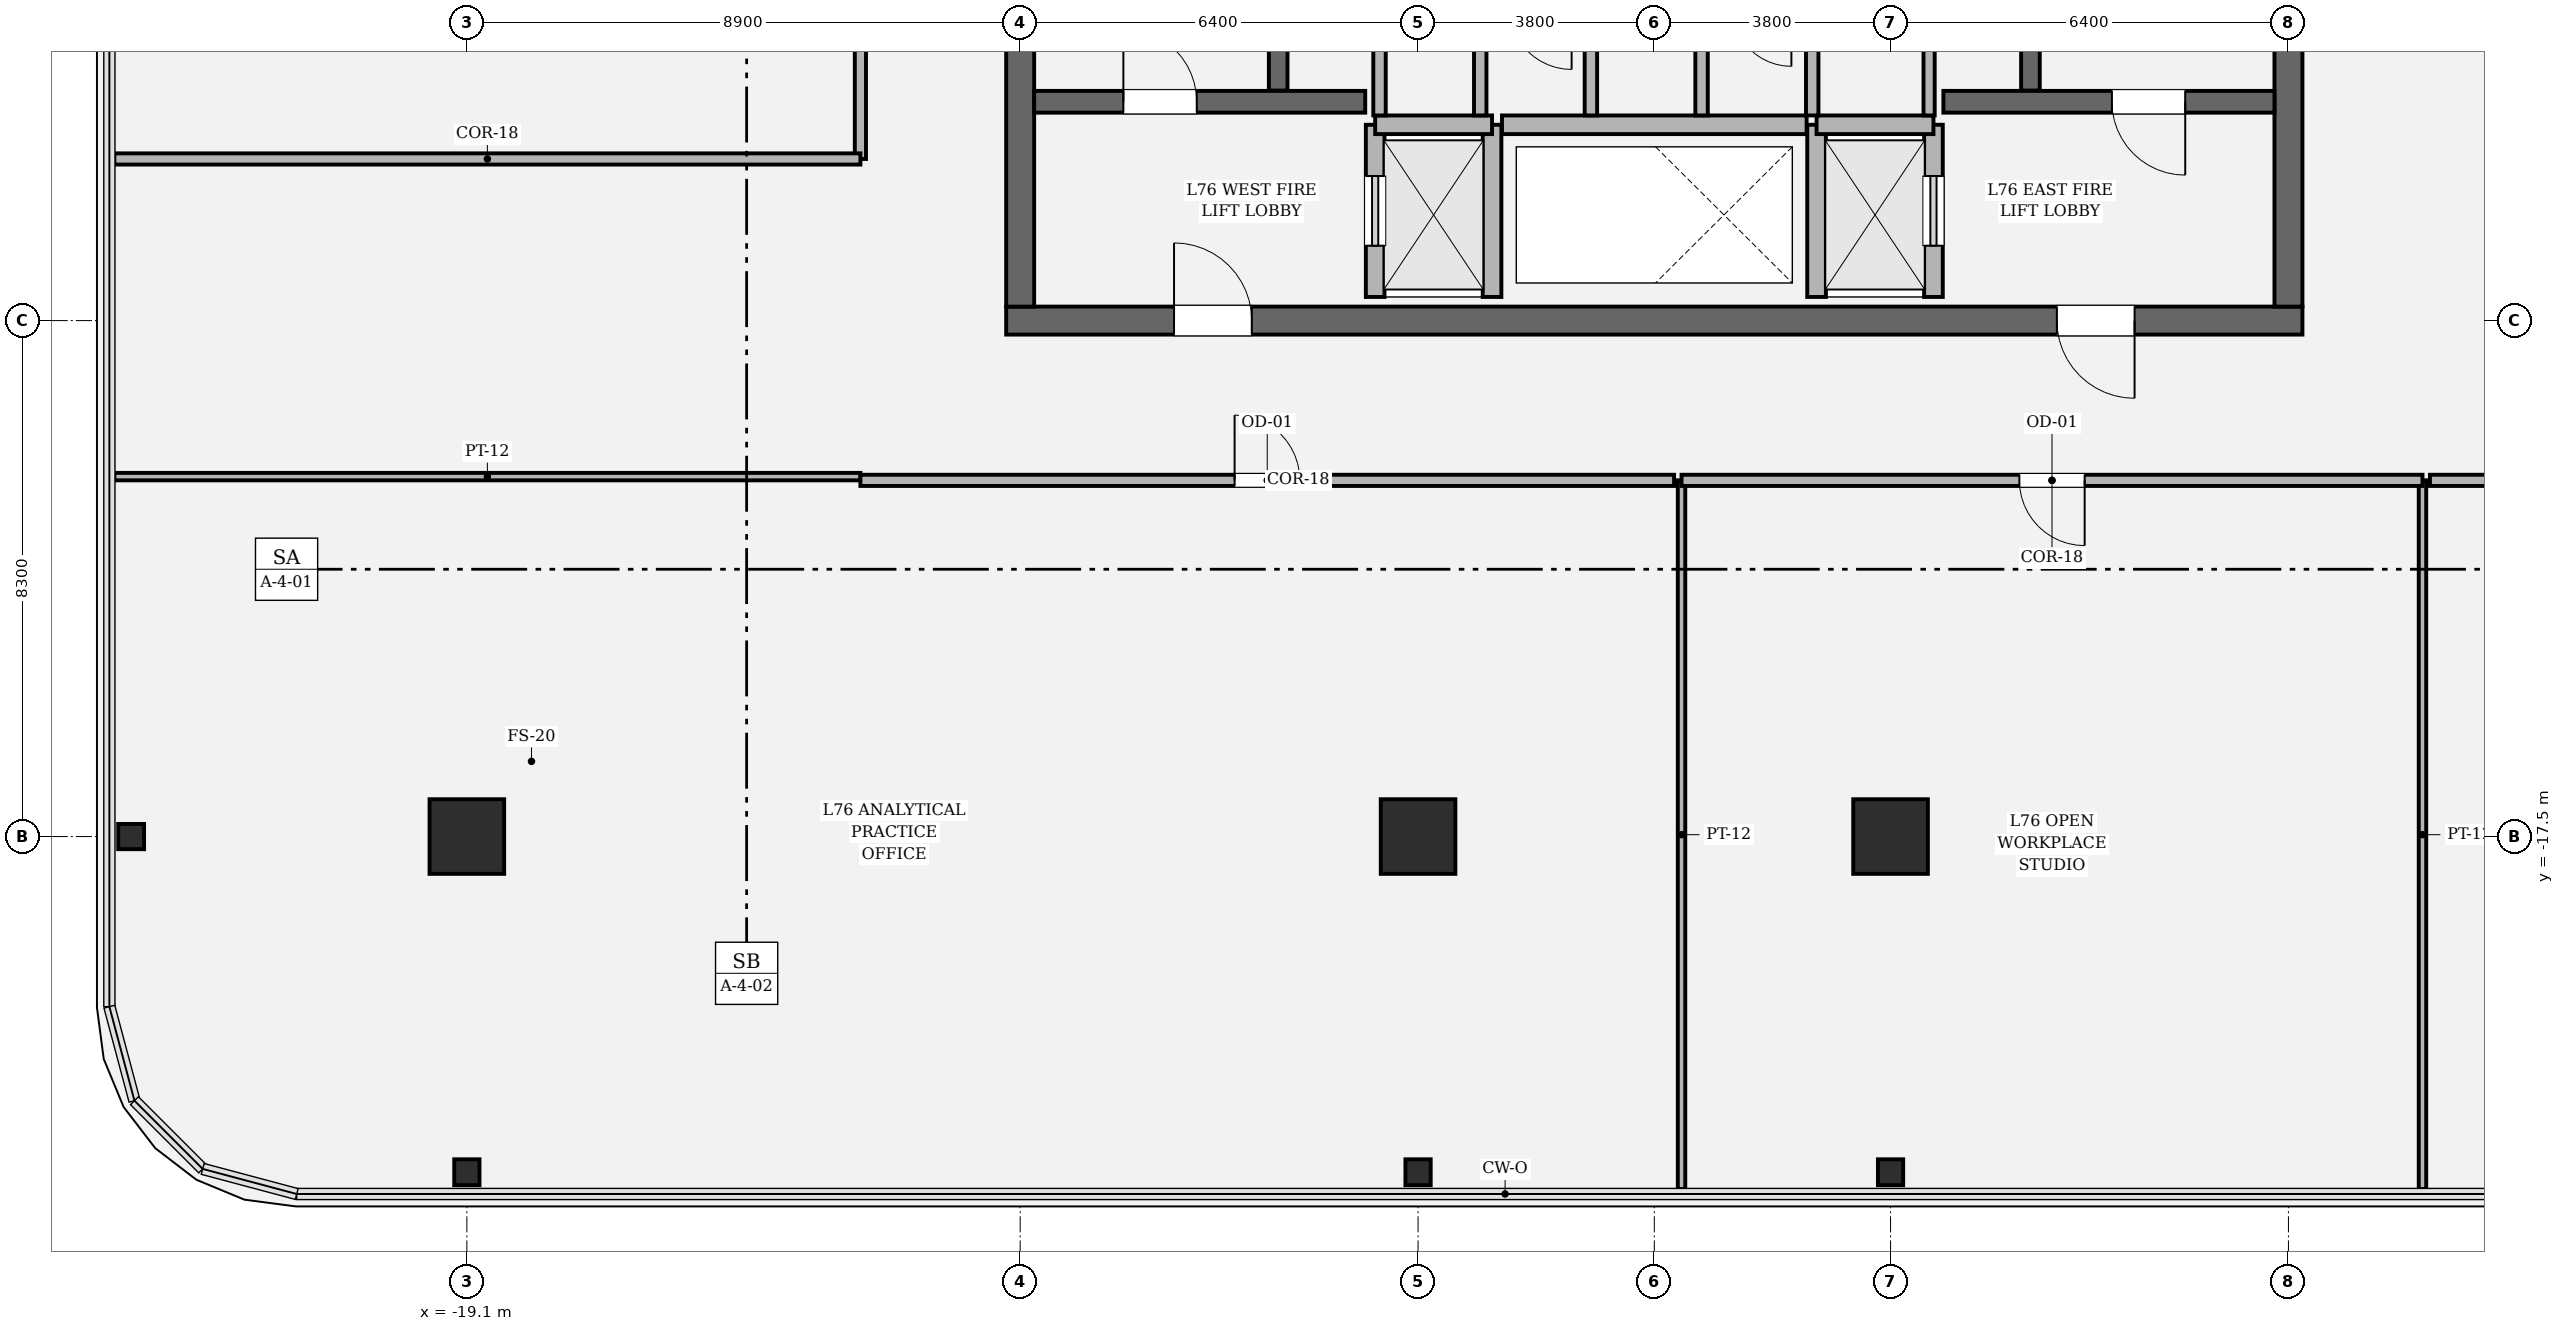
"""IFC4 building model, lengths in metres.
Left out: names, types, materials, properties, quantities, classifications, styles, units other than length and angle.
Written with IfcOpenShell. Run it as: python <this file> out.ifc"""

import sys

from ifc_helpers import new_model, si_unit, direction, frame, frame_2d, origin, origin_2d, place, context, subcontext, project, spatial, rectangle, hollow_rectangle, i_section, extrude, element, fill, save


model = new_model("IFC4")
c1 = context("Model", 3, precision=1e-05, world=origin(), true_north=direction((0.0, 1.0)))
c2 = subcontext(c1, "Body", "Model", "MODEL_VIEW")
j1 = project(units=[si_unit("LENGTHUNIT", "METRE"), si_unit("PLANEANGLEUNIT", "RADIAN")], contexts=[c1])
p1 = place(None, origin())
s1 = spatial("IfcSite", under=j1, at=p1, CompositionType="ELEMENT")
p2 = place(p1, origin())
s2 = spatial("IfcBuilding", under=s1, at=p2, CompositionType="ELEMENT")
p3 = place(p2, frame((0.0, 0.0, 321.6)))
s3 = spatial("IfcBuildingStorey", under=s2, at=p3, CompositionType="ELEMENT", Elevation=321.6)
p4 = place(p3, frame((10.425, -9.2, 0.0), z_axis=(0.0, 0.0, 1.0), x_axis=(-1.0, 0.0, 0.0)))
e1 = element("IfcWall", 1, at=p4, inside=s3, PredefinedType="SHEAR", context=c2, shape_type="SweptSolid", body=[
    extrude(rectangle(XDim=20.85, YDim=0.45, at=frame_2d((10.425, 0.0))), origin(), (0.0, 0.0, 1.0), 4.2),
])
p5 = place(p4, frame((2.7, 0.0, 0.0)))
e2 = element("IfcOpeningElement", 2, at=p5, cuts=e1, PredefinedType="OPENING", context=c2, shape_type="SweptSolid", body=[
    extrude(rectangle(XDim=1.25, YDim=2.25, at=frame_2d((0.625, 1.125))), frame((0.0, 0.235, 0.0), z_axis=(0.0, -1.0, 0.0), x_axis=(1.0, 0.0, 0.0)), (0.0, 0.0, 1.0), 0.47),
])
p6 = place(p4, frame((16.9, 0.0, 0.0)))
e3 = element("IfcOpeningElement", 3, at=p6, cuts=e1, PredefinedType="OPENING", context=c2, shape_type="SweptSolid", body=[
    extrude(rectangle(XDim=1.25, YDim=2.25, at=frame_2d((0.625, 1.125))), frame((0.0, 0.235, 0.0), z_axis=(0.0, -1.0, 0.0), x_axis=(1.0, 0.0, 0.0)), (0.0, 0.0, 1.0), 0.47),
])
p7 = place(p3, frame((-10.2, -8.975, 0.0), z_axis=(0.0, 0.0, 1.0), x_axis=(0.0, 1.0, 0.0)))
e4 = element("IfcWall", 4, at=p7, inside=s3, PredefinedType="SHEAR", context=c2, shape_type="SweptSolid", body=[
    extrude(rectangle(XDim=17.95, YDim=0.45, at=frame_2d((8.975, 0.0))), origin(), (0.0, 0.0, 1.0), 4.2),
])
p8 = place(p7, frame((12.765, 0.0, 0.0)))
e5 = element("IfcOpeningElement", 5, at=p8, cuts=e4, PredefinedType="OPENING", context=c2, shape_type="SweptSolid", body=[
    extrude(rectangle(XDim=1.18, YDim=2.2, at=frame_2d((0.59, 1.1))), frame((0.0, 0.235, 0.0), z_axis=(0.0, -1.0, 0.0), x_axis=(1.0, 0.0, 0.0)), (0.0, 0.0, 1.0), 0.47),
])
p9 = place(p3, frame((10.2, 8.975, 0.0), z_axis=(0.0, 0.0, 1.0), x_axis=(0.0, -1.0, 0.0)))
e6 = element("IfcWall", 6, at=p9, inside=s3, PredefinedType="SHEAR", context=c2, shape_type="SweptSolid", body=[
    extrude(rectangle(XDim=17.95, YDim=0.45, at=frame_2d((8.975, 0.0))), origin(), (0.0, 0.0, 1.0), 4.2),
])
p10 = place(p9, frame((4.005, 0.0, 0.0)))
e7 = element("IfcOpeningElement", 7, at=p10, cuts=e6, PredefinedType="OPENING", context=c2, shape_type="SweptSolid", body=[
    extrude(rectangle(XDim=1.18, YDim=2.2, at=frame_2d((0.59, 1.1))), frame((0.0, 0.235, 0.0), z_axis=(0.0, -1.0, 0.0), x_axis=(1.0, 0.0, 0.0)), (0.0, 0.0, 1.0), 0.47),
])
for number, where, z_axis, x_axis in (
    (8, (-6.05, -5.5, 0.0), (0.0, 0.0, 1.0), (0.0, 1.0, 0.0)),
    (9, (6.05, 3.45, 0.0), (0.0, 0.0, 1.0), (0.0, -1.0, 0.0)),
):
    element("IfcWall", number, at=place(p3, frame(where, z_axis=z_axis, x_axis=x_axis)), inside=s3, PredefinedType="SOLIDWALL", context=c2, shape_type="SweptSolid", body=[
        extrude(rectangle(XDim=8.95, YDim=0.3, at=frame_2d((4.475, 0.0))), origin(), (0.0, 0.0, 1.0), 4.2),
    ])
p11 = place(p3, frame((-9.975, -5.68, 0.0), z_axis=(0.0, 0.0, 1.0), x_axis=(1.0, 0.0, 0.0)))
e10 = element("IfcWall", 10, at=p11, inside=s3, PredefinedType="SOLIDWALL", context=c2, shape_type="SweptSolid", body=[
    extrude(rectangle(XDim=5.325, YDim=0.35, at=frame_2d((2.663, 0.0))), origin(), (0.0, 0.0, 1.0), 4.2),
])
p12 = place(p11, frame((1.435, 0.0, 0.0)))
e11 = element("IfcOpeningElement", 11, at=p12, cuts=e10, PredefinedType="OPENING", context=c2, shape_type="SweptSolid", body=[
    extrude(rectangle(XDim=1.18, YDim=2.2, at=frame_2d((0.59, 1.1))), frame((0.0, 0.185, 0.0), z_axis=(0.0, -1.0, 0.0), x_axis=(1.0, 0.0, 0.0)), (0.0, 0.0, 1.0), 0.37),
])
p13 = place(p3, frame((4.65, -5.68, 0.0), z_axis=(0.0, 0.0, 1.0), x_axis=(1.0, 0.0, 0.0)))
e12 = element("IfcWall", 12, at=p13, inside=s3, PredefinedType="SOLIDWALL", context=c2, shape_type="SweptSolid", body=[
    extrude(rectangle(XDim=5.325, YDim=0.35, at=frame_2d((2.663, 0.0))), origin(), (0.0, 0.0, 1.0), 4.2),
])
p14 = place(p13, frame((2.71, 0.0, 0.0)))
e13 = element("IfcOpeningElement", 13, at=p14, cuts=e12, PredefinedType="OPENING", context=c2, shape_type="SweptSolid", body=[
    extrude(rectangle(XDim=1.18, YDim=2.2, at=frame_2d((0.59, 1.1))), frame((0.0, 0.185, 0.0), z_axis=(0.0, -1.0, 0.0), x_axis=(1.0, 0.0, 0.0)), (0.0, 0.0, 1.0), 0.37),
])
for number, where, z_axis, x_axis in (
    (14, (-19.1, -17.5, 0.0), (0.0, 0.0, 1.0), (1.0, 0.0, 0.0)),
    (15, (-3.8, -17.5, 0.0), (0.0, 0.0, 1.0), (1.0, 0.0, 0.0)),
    (16, (3.8, -17.5, 0.0), (0.0, 0.0, 1.0), (1.0, 0.0, 0.0)),
):
    element("IfcColumn", number, at=place(p3, frame(where, z_axis=z_axis, x_axis=x_axis)), inside=s3, PredefinedType="COLUMN", context=c2, shape_type="SweptSolid", body=[
        extrude(hollow_rectangle(XDim=1.2, YDim=1.2, WallThickness=0.035, at=origin_2d()), origin(), (0.0, 0.0, 1.0), 4.2),
    ])
for number, where, z_axis, x_axis in (
    (17, (-19.1, -22.9, 0.0), (0.0, 0.0, 1.0), (1.0, 0.0, 0.0)),
    (18, (-3.8, -22.9, 0.0), (0.0, 0.0, 1.0), (1.0, 0.0, 0.0)),
    (19, (3.8, -22.9, 0.0), (0.0, 0.0, 1.0), (1.0, 0.0, 0.0)),
    (20, (-24.5, -17.5, 0.0), (0.0, 0.0, 1.0), (0.0, 1.0, 0.0)),
):
    element("IfcColumn", number, at=place(p3, frame(where, z_axis=z_axis, x_axis=x_axis)), inside=s3, PredefinedType="COLUMN", context=c2, shape_type="SweptSolid", body=[
        extrude(i_section(OverallWidth=0.406, OverallDepth=0.416, WebThickness=0.029, FlangeThickness=0.048, FilletRadius=0.018, at=origin_2d()), origin(), (0.0, 0.0, 1.0), 4.198),
    ])
p15 = place(p3, frame((-4.49, -8.82, 0.0), z_axis=(0.0, 0.0, 1.0), x_axis=(0.0, 1.0, 0.0)))
e21 = element("IfcWall", 21, at=p15, inside=s3, PredefinedType="SOLIDWALL", context=c2, shape_type="SweptSolid", body=[
    extrude(rectangle(XDim=2.77, YDim=0.3, at=frame_2d((1.385, 0.0))), origin(), (0.0, 0.0, 1.0), 4.0),
])
p16 = place(p15, frame((0.825, 0.0, 0.0)))
e22 = element("IfcOpeningElement", 22, at=p16, cuts=e21, PredefinedType="OPENING", context=c2, shape_type="SweptSolid", body=[
    extrude(rectangle(XDim=1.12, YDim=2.25, at=frame_2d((0.56, 1.125))), frame((0.0, 0.16, 0.0), z_axis=(0.0, -1.0, 0.0), x_axis=(1.0, 0.0, 0.0)), (0.0, 0.0, 1.0), 0.32),
])
p17 = place(p3, frame((-2.61, -8.82, 0.0), z_axis=(0.0, 0.0, 1.0), x_axis=(0.0, 1.0, 0.0)))
e23 = element("IfcWall", 23, at=p17, inside=s3, PredefinedType="SOLIDWALL", context=c2, shape_type="SweptSolid", body=[
    extrude(rectangle(XDim=2.77, YDim=0.3, at=frame_2d((1.385, 0.0))), origin(), (0.0, 0.0, 1.0), 4.0),
])
p18 = place(p3, frame((-4.49, -6.05, 0.0), z_axis=(0.0, 0.0, 1.0), x_axis=(1.0, 0.0, 0.0)))
e24 = element("IfcWall", 24, at=p18, inside=s3, PredefinedType="SOLIDWALL", context=c2, shape_type="SweptSolid", body=[
    extrude(rectangle(XDim=1.88, YDim=0.3, at=frame_2d((0.94, 0.0))), origin(), (0.0, 0.0, 1.0), 4.0),
])
p19 = place(p3, frame((4.49, -8.82, 0.0), z_axis=(0.0, 0.0, 1.0), x_axis=(0.0, 1.0, 0.0)))
e25 = element("IfcWall", 25, at=p19, inside=s3, PredefinedType="SOLIDWALL", context=c2, shape_type="SweptSolid", body=[
    extrude(rectangle(XDim=2.77, YDim=0.3, at=frame_2d((1.385, 0.0))), origin(), (0.0, 0.0, 1.0), 4.0),
])
p20 = place(p19, frame((0.825, 0.0, 0.0)))
e26 = element("IfcOpeningElement", 26, at=p20, cuts=e25, PredefinedType="OPENING", context=c2, shape_type="SweptSolid", body=[
    extrude(rectangle(XDim=1.12, YDim=2.25, at=frame_2d((0.56, 1.125))), frame((0.0, 0.16, 0.0), z_axis=(0.0, -1.0, 0.0), x_axis=(1.0, 0.0, 0.0)), (0.0, 0.0, 1.0), 0.32),
])
p21 = place(p3, frame((2.61, -8.82, 0.0), z_axis=(0.0, 0.0, 1.0), x_axis=(0.0, 1.0, 0.0)))
e27 = element("IfcWall", 27, at=p21, inside=s3, PredefinedType="SOLIDWALL", context=c2, shape_type="SweptSolid", body=[
    extrude(rectangle(XDim=2.77, YDim=0.3, at=frame_2d((1.385, 0.0))), origin(), (0.0, 0.0, 1.0), 4.0),
])
p22 = place(p3, frame((2.61, -6.05, 0.0), z_axis=(0.0, 0.0, 1.0), x_axis=(1.0, 0.0, 0.0)))
e28 = element("IfcWall", 28, at=p22, inside=s3, PredefinedType="SOLIDWALL", context=c2, shape_type="SweptSolid", body=[
    extrude(rectangle(XDim=1.88, YDim=0.3, at=frame_2d((0.94, 0.0))), origin(), (0.0, 0.0, 1.0), 4.0),
])
p23 = place(p3, frame((-2.45, -6.05, 0.0), z_axis=(0.0, 0.0, 1.0), x_axis=(1.0, 0.0, 0.0)))
e29 = element("IfcWall", 29, at=p23, inside=s3, PredefinedType="SOLIDWALL", context=c2, shape_type="SweptSolid", body=[
    extrude(rectangle(XDim=4.9, YDim=0.3, at=frame_2d((2.45, 0.0))), origin(), (0.0, 0.0, 1.0), 4.0),
])
for number, where, z_axis, x_axis in (
    (30, (-2.8, -5.9, 0.0), (0.0, 0.0, 1.0), (0.0, 1.0, 0.0)),
    (31, (-4.42, -4.16, 0.0), (0.0, 0.0, 1.0), (0.0, -1.0, 0.0)),
    (32, (-1.02, -5.9, 0.0), (0.0, 0.0, 1.0), (0.0, 1.0, 0.0)),
    (33, (0.76, -5.9, 0.0), (0.0, 0.0, 1.0), (0.0, 1.0, 0.0)),
    (34, (2.54, -5.9, 0.0), (0.0, 0.0, 1.0), (0.0, 1.0, 0.0)),
):
    element("IfcWall", number, at=place(p3, frame(where, z_axis=z_axis, x_axis=x_axis)), inside=s3, PredefinedType="SOLIDWALL", context=c2, shape_type="SweptSolid", body=[
        extrude(rectangle(XDim=1.74, YDim=0.2, at=frame_2d((0.87, 0.0))), origin(), (0.0, 0.0, 1.0), 4.0),
    ])
p24 = place(p3, frame((4.42, -5.9, 0.0), z_axis=(0.0, 0.0, 1.0), x_axis=(0.0, 1.0, 0.0)))
e35 = element("IfcWall", 35, at=p24, inside=s3, PredefinedType="PARTITIONING", context=c2, shape_type="SweptSolid", body=[
    extrude(rectangle(XDim=1.74, YDim=0.18, at=frame_2d((0.87, 0.0))), origin(), (0.0, 0.0, 1.0), 4.0),
])
for number, where, z_axis, x_axis in (
    (36, (12.356, -11.77, 0.0), (0.0, 0.0, 1.0), (0.0, -1.0, 0.0)),
    (37, (0.438, -23.17, 0.0), (0.0, 0.0, 1.0), (0.0, 1.0, 0.0)),
):
    element("IfcWall", number, at=place(p3, frame(where, z_axis=z_axis, x_axis=x_axis)), inside=s3, PredefinedType="PARTITIONING", context=c2, shape_type="SweptSolid", body=[
        extrude(rectangle(XDim=11.4, YDim=0.12, at=frame_2d((5.7, 0.0))), origin(), (0.0, 0.0, 1.0), 2.714),
    ])
p25 = place(p3, frame((0.438, -11.77, 0.0), z_axis=(0.0, 0.0, 1.0), x_axis=(1.0, 0.0, 0.0)))
e38 = element("IfcWall", 38, at=p25, inside=s3, PredefinedType="PARTITIONING", context=c2, shape_type="SweptSolid", body=[
    extrude(rectangle(XDim=11.918, YDim=0.18, at=frame_2d((5.959, 0.0))), origin(), (0.0, 0.0, 1.0), 3.394),
])
p26 = place(p25, frame((5.434, 0.0, 0.0)))
e39 = element("IfcOpeningElement", 39, at=p26, cuts=e38, PredefinedType="OPENING", context=c2, shape_type="SweptSolid", body=[
    extrude(rectangle(XDim=1.05, YDim=2.2, at=frame_2d((0.525, 1.1))), frame((0.0, 0.1, 0.0), z_axis=(0.0, -1.0, 0.0), x_axis=(1.0, 0.0, 0.0)), (0.0, 0.0, 1.0), 0.2),
])
p27 = place(p3, frame((-24.77, -11.71, 0.0), z_axis=(0.0, 0.0, 1.0), x_axis=(1.0, 0.0, 0.0)))
e40 = element("IfcWall", 40, at=p27, inside=s3, PredefinedType="PARTITIONING", context=c2, shape_type="SweptSolid", body=[
    extrude(rectangle(XDim=12.0, YDim=0.12, at=frame_2d((6.0, 0.0))), origin(), (0.0, 0.0, 1.0), 2.714),
])
p28 = place(p3, frame((-12.77, -11.77, 0.0), z_axis=(0.0, 0.0, 1.0), x_axis=(1.0, 0.0, 0.0)))
e41 = element("IfcWall", 41, at=p28, inside=s3, PredefinedType="PARTITIONING", context=c2, shape_type="SweptSolid", body=[
    extrude(rectangle(XDim=13.088, YDim=0.18, at=frame_2d((6.544, 0.0))), origin(), (0.0, 0.0, 1.0), 3.394),
])
p29 = place(p28, frame((6.019, 0.0, 0.0)))
e42 = element("IfcOpeningElement", 42, at=p29, cuts=e41, PredefinedType="OPENING", context=c2, shape_type="SweptSolid", body=[
    extrude(rectangle(XDim=1.05, YDim=2.2, at=frame_2d((0.525, 1.1))), frame((0.0, 0.1, 0.0), z_axis=(0.0, -1.0, 0.0), x_axis=(1.0, 0.0, 0.0)), (0.0, 0.0, 1.0), 0.2),
])
p30 = place(p3, frame((12.476, -11.77, 0.0), z_axis=(0.0, 0.0, 1.0), x_axis=(1.0, 0.0, 0.0)))
e43 = element("IfcWall", 43, at=p30, inside=s3, PredefinedType="PARTITIONING", context=c2, shape_type="SweptSolid", body=[
    extrude(rectangle(XDim=3.794, YDim=0.18, at=frame_2d((1.897, 0.0))), origin(), (0.0, 0.0, 1.0), 3.634),
])
p31 = place(p30, frame((1.372, 0.0, 0.0)))
e44 = element("IfcOpeningElement", 44, at=p31, cuts=e43, PredefinedType="OPENING", context=c2, shape_type="SweptSolid", body=[
    extrude(rectangle(XDim=1.05, YDim=2.2, at=frame_2d((0.525, 1.1))), frame((0.0, 0.1, 0.0), z_axis=(0.0, -1.0, 0.0), x_axis=(1.0, 0.0, 0.0)), (0.0, 0.0, 1.0), 0.2),
])
p32 = place(p3, frame((-12.77, 2.712, 0.0), z_axis=(0.0, 0.0, 1.0), x_axis=(0.0, -1.0, 0.0)))
e45 = element("IfcWall", 45, at=p32, inside=s3, PredefinedType="PARTITIONING", context=c2, shape_type="SweptSolid", body=[
    extrude(rectangle(XDim=9.312, YDim=0.18, at=frame_2d((4.656, 0.0))), origin(), (0.0, 0.0, 1.0), 3.394),
])
p33 = place(p32, frame((4.131, 0.0, 0.0)))
e46 = element("IfcOpeningElement", 46, at=p33, cuts=e45, PredefinedType="OPENING", context=c2, shape_type="SweptSolid", body=[
    extrude(rectangle(XDim=1.05, YDim=2.2, at=frame_2d((0.525, 1.1))), frame((0.0, 0.1, 0.0), z_axis=(0.0, -1.0, 0.0), x_axis=(1.0, 0.0, 0.0)), (0.0, 0.0, 1.0), 0.2),
])
p34 = place(p3, frame((-12.77, -6.6, 0.0), z_axis=(0.0, 0.0, 1.0), x_axis=(-1.0, 0.0, 0.0)))
e47 = element("IfcWall", 47, at=p34, inside=s3, PredefinedType="PARTITIONING", context=c2, shape_type="SweptSolid", body=[
    extrude(rectangle(XDim=12.0, YDim=0.18, at=frame_2d((6.0, 0.0))), origin(), (0.0, 0.0, 1.0), 2.714),
])
p35 = place(p12, origin())
e48 = element("IfcDoor", 48, at=p35, inside=s3, OperationType="SINGLE_SWING_LEFT", PredefinedType="DOOR", context=c2, shape_type="SweptSolid", body=[
    extrude(rectangle(XDim=1.18, YDim=2.2, at=frame_2d((0.59, 1.1))), frame((0.0, 0.025, 0.0), z_axis=(0.0, -1.0, 0.0), x_axis=(1.0, 0.0, 0.0)), (0.0, 0.0, 1.0), 0.05),
])
fill(e11, e48)
p36 = place(p14, origin())
e49 = element("IfcDoor", 49, at=p36, inside=s3, OperationType="SINGLE_SWING_RIGHT", PredefinedType="DOOR", context=c2, shape_type="SweptSolid", body=[
    extrude(rectangle(XDim=1.18, YDim=2.2, at=frame_2d((0.59, 1.1))), frame((0.0, 0.025, 0.0), z_axis=(0.0, -1.0, 0.0), x_axis=(1.0, 0.0, 0.0)), (0.0, 0.0, 1.0), 0.05),
])
fill(e13, e49)
p37 = place(p5, origin())
e50 = element("IfcDoor", 50, at=p37, inside=s3, OperationType="SINGLE_SWING_LEFT", PredefinedType="DOOR", context=c2, shape_type="SweptSolid", body=[
    extrude(rectangle(XDim=1.25, YDim=2.25, at=frame_2d((0.625, 1.125))), frame((0.0, 0.025, 0.0), z_axis=(0.0, -1.0, 0.0), x_axis=(1.0, 0.0, 0.0)), (0.0, 0.0, 1.0), 0.05),
])
fill(e2, e50)
p38 = place(p6, origin())
e51 = element("IfcDoor", 51, at=p38, inside=s3, OperationType="SINGLE_SWING_RIGHT", PredefinedType="DOOR", context=c2, shape_type="SweptSolid", body=[
    extrude(rectangle(XDim=1.25, YDim=2.25, at=frame_2d((0.625, 1.125))), frame((0.0, 0.025, 0.0), z_axis=(0.0, -1.0, 0.0), x_axis=(1.0, 0.0, 0.0)), (0.0, 0.0, 1.0), 0.05),
])
fill(e3, e51)
p39 = place(p16, origin())
e52 = element("IfcDoor", 52, at=p39, inside=s3, OperationType="SLIDING_TO_LEFT", PredefinedType="DOOR", context=c2, shape_type="SweptSolid", body=[
    extrude(rectangle(XDim=1.12, YDim=2.25, at=frame_2d((0.56, 1.125))), frame((0.0, 0.025, 0.0), z_axis=(0.0, -1.0, 0.0), x_axis=(1.0, 0.0, 0.0)), (0.0, 0.0, 1.0), 0.05),
])
fill(e22, e52)
p40 = place(p20, origin())
e53 = element("IfcDoor", 53, at=p40, inside=s3, OperationType="SLIDING_TO_RIGHT", PredefinedType="DOOR", context=c2, shape_type="SweptSolid", body=[
    extrude(rectangle(XDim=1.12, YDim=2.25, at=frame_2d((0.56, 1.125))), frame((0.0, 0.025, 0.0), z_axis=(0.0, -1.0, 0.0), x_axis=(1.0, 0.0, 0.0)), (0.0, 0.0, 1.0), 0.05),
])
fill(e26, e53)
p41 = place(p26, origin())
e54 = element("IfcDoor", 54, at=p41, inside=s3, OperationType="SINGLE_SWING_RIGHT", PredefinedType="DOOR", context=c2, shape_type="SweptSolid", body=[
    extrude(rectangle(XDim=1.05, YDim=2.2, at=frame_2d((0.525, 1.1))), frame((0.0, 0.025, 0.0), z_axis=(0.0, -1.0, 0.0), x_axis=(1.0, 0.0, 0.0)), (0.0, 0.0, 1.0), 0.05),
])
fill(e39, e54)
p42 = place(p29, origin())
e55 = element("IfcDoor", 55, at=p42, inside=s3, OperationType="SINGLE_SWING_LEFT", PredefinedType="DOOR", context=c2, shape_type="SweptSolid", body=[
    extrude(rectangle(XDim=1.05, YDim=2.2, at=frame_2d((0.525, 1.1))), frame((0.0, 0.025, 0.0), z_axis=(0.0, -1.0, 0.0), x_axis=(1.0, 0.0, 0.0)), (0.0, 0.0, 1.0), 0.05),
])
fill(e42, e55)
save(model, sys.argv[1])
